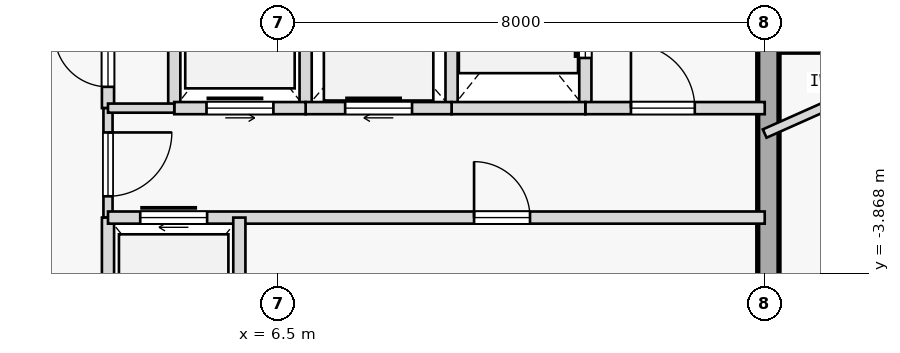
"""IFC4 building model, lengths in metres.
Left out: names, types, materials, properties, quantities, classifications, styles, units other than length and angle.
Written with IfcOpenShell. Run it as: python <this file> out.ifc"""

import sys

from ifc_helpers import new_model, si_unit, direction, frame, frame_2d, origin, place, context, subcontext, project, spatial, rectangle, extrude, element, fill, save


model = new_model("IFC4")
c1 = context("Model", 3, precision=1e-05, world=origin(), true_north=direction((0.0, 1.0)))
c2 = subcontext(c1, "Body", "Model", "MODEL_VIEW")
j1 = project(units=[si_unit("LENGTHUNIT", "METRE"), si_unit("PLANEANGLEUNIT", "RADIAN")], contexts=[c1])
p1 = place(None, origin())
s1 = spatial("IfcSite", under=j1, at=p1, CompositionType="ELEMENT")
p2 = place(p1, origin())
s2 = spatial("IfcBuilding", under=s1, at=p2, CompositionType="ELEMENT")
p3 = place(p2, frame((0.0, 0.0, 285.25)))
s3 = spatial("IfcBuildingStorey", under=s2, at=p3, CompositionType="ELEMENT", Elevation=285.25)
p4 = place(p3, frame((14.56, -5.425, 0.0), z_axis=(0.0, 0.0, 1.0), x_axis=(0.0, 1.0, 0.0)))
e1 = element("IfcWall", 1, at=p4, inside=s3, PredefinedType="SHEAR", context=c2, shape_type="SweptSolid", body=[
    extrude(rectangle(XDim=10.85, YDim=0.35, at=frame_2d((5.425, 0.0))), origin(), (0.0, 0.0, 1.0), 3.125),
])
p5 = place(p3, frame((3.7, -1.15, 0.0), z_axis=(0.0, 0.0, 1.0), x_axis=(0.0, 1.0, 0.0)))
e2 = element("IfcWall", 2, at=p5, inside=s3, PredefinedType="STANDARD", context=c2, shape_type="SweptSolid", body=[
    extrude(rectangle(XDim=6.75, YDim=0.2, at=frame_2d((3.375, 0.0))), origin(), (0.0, 0.0, 1.0), 3.125),
])
p6 = place(p5, frame((0.35, 0.0, 0.0)))
e3 = element("IfcOpeningElement", 3, at=p6, cuts=e2, PredefinedType="OPENING", context=c2, shape_type="SweptSolid", body=[
    extrude(rectangle(XDim=0.88, YDim=2.15, at=frame_2d((0.44, 1.075))), frame((0.0, 0.11, 0.0), z_axis=(0.0, -1.0, 0.0), x_axis=(1.0, 0.0, 0.0)), (0.0, 0.0, 1.0), 0.22),
])
p7 = place(p5, frame((2.55, 0.0, 0.0)))
e4 = element("IfcOpeningElement", 4, at=p7, cuts=e2, PredefinedType="OPENING", context=c2, shape_type="SweptSolid", body=[
    extrude(rectangle(XDim=0.92, YDim=2.15, at=frame_2d((0.46, 1.075))), frame((0.0, 0.11, 0.0), z_axis=(0.0, -1.0, 0.0), x_axis=(1.0, 0.0, 0.0)), (0.0, 0.0, 1.0), 0.22),
])
p8 = place(p5, frame((4.22, 0.0, 0.0)))
e5 = element("IfcOpeningElement", 5, at=p8, cuts=e2, PredefinedType="OPENING", context=c2, shape_type="SweptSolid", body=[
    extrude(rectangle(XDim=0.88, YDim=2.15, at=frame_2d((0.44, 1.075))), frame((0.0, 0.11, 0.0), z_axis=(0.0, -1.0, 0.0), x_axis=(1.0, 0.0, 0.0)), (0.0, 0.0, 1.0), 0.22),
])
p9 = place(p3, frame((3.7, -2.95, 0.0), z_axis=(0.0, 0.0, 1.0), x_axis=(0.0, 1.0, 0.0)))
e6 = element("IfcWall", 6, at=p9, inside=s3, PredefinedType="PARTITIONING", context=c2, shape_type="SweptSolid", body=[
    extrude(rectangle(XDim=1.8, YDim=0.15, at=frame_2d((0.9, 0.0))), origin(), (0.0, 0.0, 1.0), 3.125),
])
p10 = place(p9, frame((0.35, 0.0, 0.0)))
e7 = element("IfcOpeningElement", 7, at=p10, cuts=e6, PredefinedType="OPENING", context=c2, shape_type="SweptSolid", body=[
    extrude(rectangle(XDim=1.05, YDim=2.18, at=frame_2d((0.525, 1.09))), frame((0.0, 0.085, 0.0), z_axis=(0.0, -1.0, 0.0), x_axis=(1.0, 0.0, 0.0)), (0.0, 0.0, 1.0), 0.17),
])
p11 = place(p3, frame((3.7, -5.6, 0.0), z_axis=(0.0, 0.0, 1.0), x_axis=(0.0, 1.0, 0.0)))
e8 = element("IfcWall", 8, at=p11, inside=s3, PredefinedType="STANDARD", context=c2, shape_type="SweptSolid", body=[
    extrude(rectangle(XDim=2.65, YDim=0.2, at=frame_2d((1.325, 0.0))), origin(), (0.0, 0.0, 1.0), 3.125),
])
p12 = place(p3, frame((11.55, -1.15, 0.0), z_axis=(0.0, 0.0, 1.0), x_axis=(0.0, 1.0, 0.0)))
e9 = element("IfcWall", 9, at=p12, inside=s3, PredefinedType="STANDARD", context=c2, shape_type="SweptSolid", body=[
    extrude(rectangle(XDim=2.75, YDim=0.2, at=frame_2d((1.375, 0.0))), origin(), (0.0, 0.0, 1.0), 3.125),
])
p13 = place(p12, frame((0.825, 0.0, 0.0)))
e10 = element("IfcOpeningElement", 10, at=p13, cuts=e9, PredefinedType="OPENING", context=c2, shape_type="SweptSolid", body=[
    extrude(rectangle(XDim=1.1, YDim=2.15, at=frame_2d((0.55, 1.075))), frame((0.0, 0.11, 0.0), z_axis=(0.0, -1.0, 0.0), x_axis=(1.0, 0.0, 0.0)), (0.0, 0.0, 1.0), 0.22),
])
p14 = place(p3, frame((9.35, -1.15, 0.0), z_axis=(0.0, 0.0, 1.0), x_axis=(0.0, 1.0, 0.0)))
e11 = element("IfcWall", 11, at=p14, inside=s3, PredefinedType="STANDARD", context=c2, shape_type="SweptSolid", body=[
    extrude(rectangle(XDim=2.75, YDim=0.2, at=frame_2d((1.375, 0.0))), origin(), (0.0, 0.0, 1.0), 3.125),
])
p15 = place(p3, frame((11.55, -1.15, 0.0), z_axis=(0.0, 0.0, 1.0), x_axis=(1.0, 0.0, 0.0)))
e12 = element("IfcWall", 12, at=p15, inside=s3, PredefinedType="STANDARD", context=c2, shape_type="SweptSolid", body=[
    extrude(rectangle(XDim=2.95, YDim=0.2, at=frame_2d((1.475, 0.0))), origin(), (0.0, 0.0, 1.0), 3.125),
])
p16 = place(p15, frame((0.75, 0.0, 0.0)))
e13 = element("IfcOpeningElement", 13, at=p16, cuts=e12, PredefinedType="OPENING", context=c2, shape_type="SweptSolid", body=[
    extrude(rectangle(XDim=1.05, YDim=2.18, at=frame_2d((0.525, 1.09))), frame((0.0, 0.11, 0.0), z_axis=(0.0, -1.0, 0.0), x_axis=(1.0, 0.0, 0.0)), (0.0, 0.0, 1.0), 0.22),
])
p17 = place(p3, frame((9.35, -1.15, 0.0), z_axis=(0.0, 0.0, 1.0), x_axis=(1.0, 0.0, 0.0)))
e14 = element("IfcWall", 14, at=p17, inside=s3, PredefinedType="STANDARD", context=c2, shape_type="SweptSolid", body=[
    extrude(rectangle(XDim=2.2, YDim=0.2, at=frame_2d((1.1, 0.0))), origin(), (0.0, 0.0, 1.0), 3.125),
])
p18 = place(p3, frame((6.95, -1.15, 0.0), z_axis=(0.0, 0.0, 1.0), x_axis=(0.0, 1.0, 0.0)))
e15 = element("IfcWall", 15, at=p18, inside=s3, PredefinedType="STANDARD", context=c2, shape_type="SweptSolid", body=[
    extrude(rectangle(XDim=2.75, YDim=0.2, at=frame_2d((1.375, 0.0))), origin(), (0.0, 0.0, 1.0), 3.125),
])
p19 = place(p3, frame((6.95, -1.15, 0.0), z_axis=(0.0, 0.0, 1.0), x_axis=(1.0, 0.0, 0.0)))
e16 = element("IfcWall", 16, at=p19, inside=s3, PredefinedType="STANDARD", context=c2, shape_type="SweptSolid", body=[
    extrude(rectangle(XDim=2.4, YDim=0.2, at=frame_2d((1.2, 0.0))), origin(), (0.0, 0.0, 1.0), 3.125),
])
p20 = place(p19, frame((0.65, 0.0, 0.0)))
e17 = element("IfcOpeningElement", 17, at=p20, cuts=e16, PredefinedType="OPENING", context=c2, shape_type="SweptSolid", body=[
    extrude(rectangle(XDim=1.1, YDim=2.15, at=frame_2d((0.55, 1.075))), frame((0.0, 0.11, 0.0), z_axis=(0.0, -1.0, 0.0), x_axis=(1.0, 0.0, 0.0)), (0.0, 0.0, 1.0), 0.22),
])
p21 = place(p3, frame((4.79, -1.15, 0.0), z_axis=(0.0, 0.0, 1.0), x_axis=(0.0, 1.0, 0.0)))
e18 = element("IfcWall", 18, at=p21, inside=s3, PredefinedType="STANDARD", context=c2, shape_type="SweptSolid", body=[
    extrude(rectangle(XDim=2.75, YDim=0.2, at=frame_2d((1.375, 0.0))), origin(), (0.0, 0.0, 1.0), 3.125),
])
p22 = place(p3, frame((4.79, -1.15, 0.0), z_axis=(0.0, 0.0, 1.0), x_axis=(1.0, 0.0, 0.0)))
e19 = element("IfcWall", 19, at=p22, inside=s3, PredefinedType="STANDARD", context=c2, shape_type="SweptSolid", body=[
    extrude(rectangle(XDim=2.16, YDim=0.2, at=frame_2d((1.08, 0.0))), origin(), (0.0, 0.0, 1.0), 3.125),
])
p23 = place(p22, frame((0.53, 0.0, 0.0)))
e20 = element("IfcOpeningElement", 20, at=p23, cuts=e19, PredefinedType="OPENING", context=c2, shape_type="SweptSolid", body=[
    extrude(rectangle(XDim=1.1, YDim=2.15, at=frame_2d((0.55, 1.075))), frame((0.0, 0.11, 0.0), z_axis=(0.0, -1.0, 0.0), x_axis=(1.0, 0.0, 0.0)), (0.0, 0.0, 1.0), 0.22),
])
p24 = place(p3, frame((3.7, -1.15, 0.0), z_axis=(0.0, 0.0, 1.0), x_axis=(1.0, 0.0, 0.0)))
e21 = element("IfcWall", 21, at=p24, inside=s3, PredefinedType="PARTITIONING", context=c2, shape_type="SweptSolid", body=[
    extrude(rectangle(XDim=1.09, YDim=0.15, at=frame_2d((0.545, 0.0))), origin(), (0.0, 0.0, 1.0), 3.125),
])
p25 = place(p3, frame((3.7, -2.95, 0.0), z_axis=(0.0, 0.0, 1.0), x_axis=(1.0, 0.0, 0.0)))
e22 = element("IfcWall", 22, at=p25, inside=s3, PredefinedType="STANDARD", context=c2, shape_type="SweptSolid", body=[
    extrude(rectangle(XDim=10.8, YDim=0.2, at=frame_2d((5.4, 0.0))), origin(), (0.0, 0.0, 1.0), 3.125),
])
p26 = place(p25, frame((0.53, 0.0, 0.0)))
e23 = element("IfcOpeningElement", 23, at=p26, cuts=e22, PredefinedType="OPENING", context=c2, shape_type="SweptSolid", body=[
    extrude(rectangle(XDim=1.1, YDim=2.15, at=frame_2d((0.55, 1.075))), frame((0.0, 0.11, 0.0), z_axis=(0.0, -1.0, 0.0), x_axis=(1.0, 0.0, 0.0)), (0.0, 0.0, 1.0), 0.22),
])
p27 = place(p25, frame((6.02, 0.0, 0.0)))
e24 = element("IfcOpeningElement", 24, at=p27, cuts=e22, PredefinedType="OPENING", context=c2, shape_type="SweptSolid", body=[
    extrude(rectangle(XDim=0.92, YDim=2.15, at=frame_2d((0.46, 1.075))), frame((0.0, 0.11, 0.0), z_axis=(0.0, -1.0, 0.0), x_axis=(1.0, 0.0, 0.0)), (0.0, 0.0, 1.0), 0.22),
])
p28 = place(p3, frame((5.86, -5.6, 0.0), z_axis=(0.0, 0.0, 1.0), x_axis=(0.0, 1.0, 0.0)))
e25 = element("IfcWall", 25, at=p28, inside=s3, PredefinedType="STANDARD", context=c2, shape_type="SweptSolid", body=[
    extrude(rectangle(XDim=2.65, YDim=0.2, at=frame_2d((1.325, 0.0))), origin(), (0.0, 0.0, 1.0), 3.125),
])
p29 = place(p3, frame((14.5, -5.6, 0.0), z_axis=(0.0, 0.0, 1.0), x_axis=(0.913550607208, 0.406725076766, 0.0)))
e26 = element("IfcWall", 26, at=p29, inside=s3, PredefinedType="PARTITIONING", context=c2, shape_type="SweptSolid", body=[
    extrude(rectangle(XDim=4.556, YDim=0.15, at=frame_2d((2.278, 0.0))), origin(), (0.0, 0.0, 1.0), 3.125),
])
p30 = place(p29, frame((2.501, 0.0, 0.0)))
e27 = element("IfcOpeningElement", 27, at=p30, cuts=e26, PredefinedType="OPENING", context=c2, shape_type="SweptSolid", body=[
    extrude(rectangle(XDim=0.92, YDim=2.15, at=frame_2d((0.46, 1.075))), frame((0.0, 0.085, 0.0), z_axis=(0.0, -1.0, 0.0), x_axis=(1.0, 0.0, 0.0)), (0.0, 0.0, 1.0), 0.17),
])
p31 = place(p3, frame((14.5, -1.568, 0.0), z_axis=(0.0, 0.0, 1.0), x_axis=(0.91354204122, 0.4067443164, 0.0)))
e28 = element("IfcWall", 28, at=p31, inside=s3, PredefinedType="PARTITIONING", context=c2, shape_type="SweptSolid", body=[
    extrude(rectangle(XDim=2.916, YDim=0.15, at=frame_2d((1.458, 0.0))), origin(), (0.0, 0.0, 1.0), 3.125),
])
p32 = place(p16, origin())
e29 = element("IfcDoor", 29, at=p32, inside=s3, OperationType="SINGLE_SWING_LEFT", PredefinedType="DOOR", context=c2, shape_type="SweptSolid", body=[
    extrude(rectangle(XDim=1.05, YDim=2.18, at=frame_2d((0.525, 1.09))), frame((0.0, 0.025, 0.0), z_axis=(0.0, -1.0, 0.0), x_axis=(1.0, 0.0, 0.0)), (0.0, 0.0, 1.0), 0.05),
])
fill(e13, e29)
p33 = place(p10, frame((1.05, 0.0, 0.0), z_axis=(0.0, 0.0, 1.0), x_axis=(-1.0, 0.0, 0.0)))
e30 = element("IfcDoor", 30, at=p33, inside=s3, OperationType="SINGLE_SWING_RIGHT", PredefinedType="DOOR", context=c2, shape_type="SweptSolid", body=[
    extrude(rectangle(XDim=1.05, YDim=2.18, at=frame_2d((0.525, 1.09))), frame((0.0, 0.025, 0.0), z_axis=(0.0, -1.0, 0.0), x_axis=(1.0, 0.0, 0.0)), (0.0, 0.0, 1.0), 0.05),
])
fill(e7, e30)
p34 = place(p13, origin())
e31 = element("IfcDoor", 31, at=p34, inside=s3, OperationType="SLIDING_TO_RIGHT", PredefinedType="DOOR", context=c2, shape_type="SweptSolid", body=[
    extrude(rectangle(XDim=1.1, YDim=2.15, at=frame_2d((0.55, 1.075))), frame((0.0, 0.025, 0.0), z_axis=(0.0, -1.0, 0.0), x_axis=(1.0, 0.0, 0.0)), (0.0, 0.0, 1.0), 0.05),
])
fill(e10, e31)
p35 = place(p20, origin())
e32 = element("IfcDoor", 32, at=p35, inside=s3, OperationType="SLIDING_TO_RIGHT", PredefinedType="DOOR", context=c2, shape_type="SweptSolid", body=[
    extrude(rectangle(XDim=1.1, YDim=2.15, at=frame_2d((0.55, 1.075))), frame((0.0, 0.025, 0.0), z_axis=(0.0, -1.0, 0.0), x_axis=(1.0, 0.0, 0.0)), (0.0, 0.0, 1.0), 0.05),
])
fill(e17, e32)
p36 = place(p23, origin())
e33 = element("IfcDoor", 33, at=p36, inside=s3, OperationType="SLIDING_TO_LEFT", PredefinedType="DOOR", context=c2, shape_type="SweptSolid", body=[
    extrude(rectangle(XDim=1.1, YDim=2.15, at=frame_2d((0.55, 1.075))), frame((0.0, 0.025, 0.0), z_axis=(0.0, -1.0, 0.0), x_axis=(1.0, 0.0, 0.0)), (0.0, 0.0, 1.0), 0.05),
])
fill(e20, e33)
p37 = place(p26, origin())
e34 = element("IfcDoor", 34, at=p37, inside=s3, OperationType="SLIDING_TO_RIGHT", PredefinedType="DOOR", context=c2, shape_type="SweptSolid", body=[
    extrude(rectangle(XDim=1.1, YDim=2.15, at=frame_2d((0.55, 1.075))), frame((0.0, 0.025, 0.0), z_axis=(0.0, -1.0, 0.0), x_axis=(1.0, 0.0, 0.0)), (0.0, 0.0, 1.0), 0.05),
])
fill(e23, e34)
p38 = place(p27, origin())
e35 = element("IfcDoor", 35, at=p38, inside=s3, OperationType="SINGLE_SWING_LEFT", PredefinedType="DOOR", context=c2, shape_type="SweptSolid", body=[
    extrude(rectangle(XDim=0.92, YDim=2.15, at=frame_2d((0.46, 1.075))), frame((0.0, 0.025, 0.0), z_axis=(0.0, -1.0, 0.0), x_axis=(1.0, 0.0, 0.0)), (0.0, 0.0, 1.0), 0.05),
])
fill(e24, e35)
p39 = place(p6, origin())
e36 = element("IfcDoor", 36, at=p39, inside=s3, OperationType="SINGLE_SWING_RIGHT", PredefinedType="DOOR", context=c2, shape_type="SweptSolid", body=[
    extrude(rectangle(XDim=0.88, YDim=2.15, at=frame_2d((0.44, 1.075))), frame((0.0, 0.025, 0.0), z_axis=(0.0, -1.0, 0.0), x_axis=(1.0, 0.0, 0.0)), (0.0, 0.0, 1.0), 0.05),
])
fill(e3, e36)
save(model, sys.argv[1])
